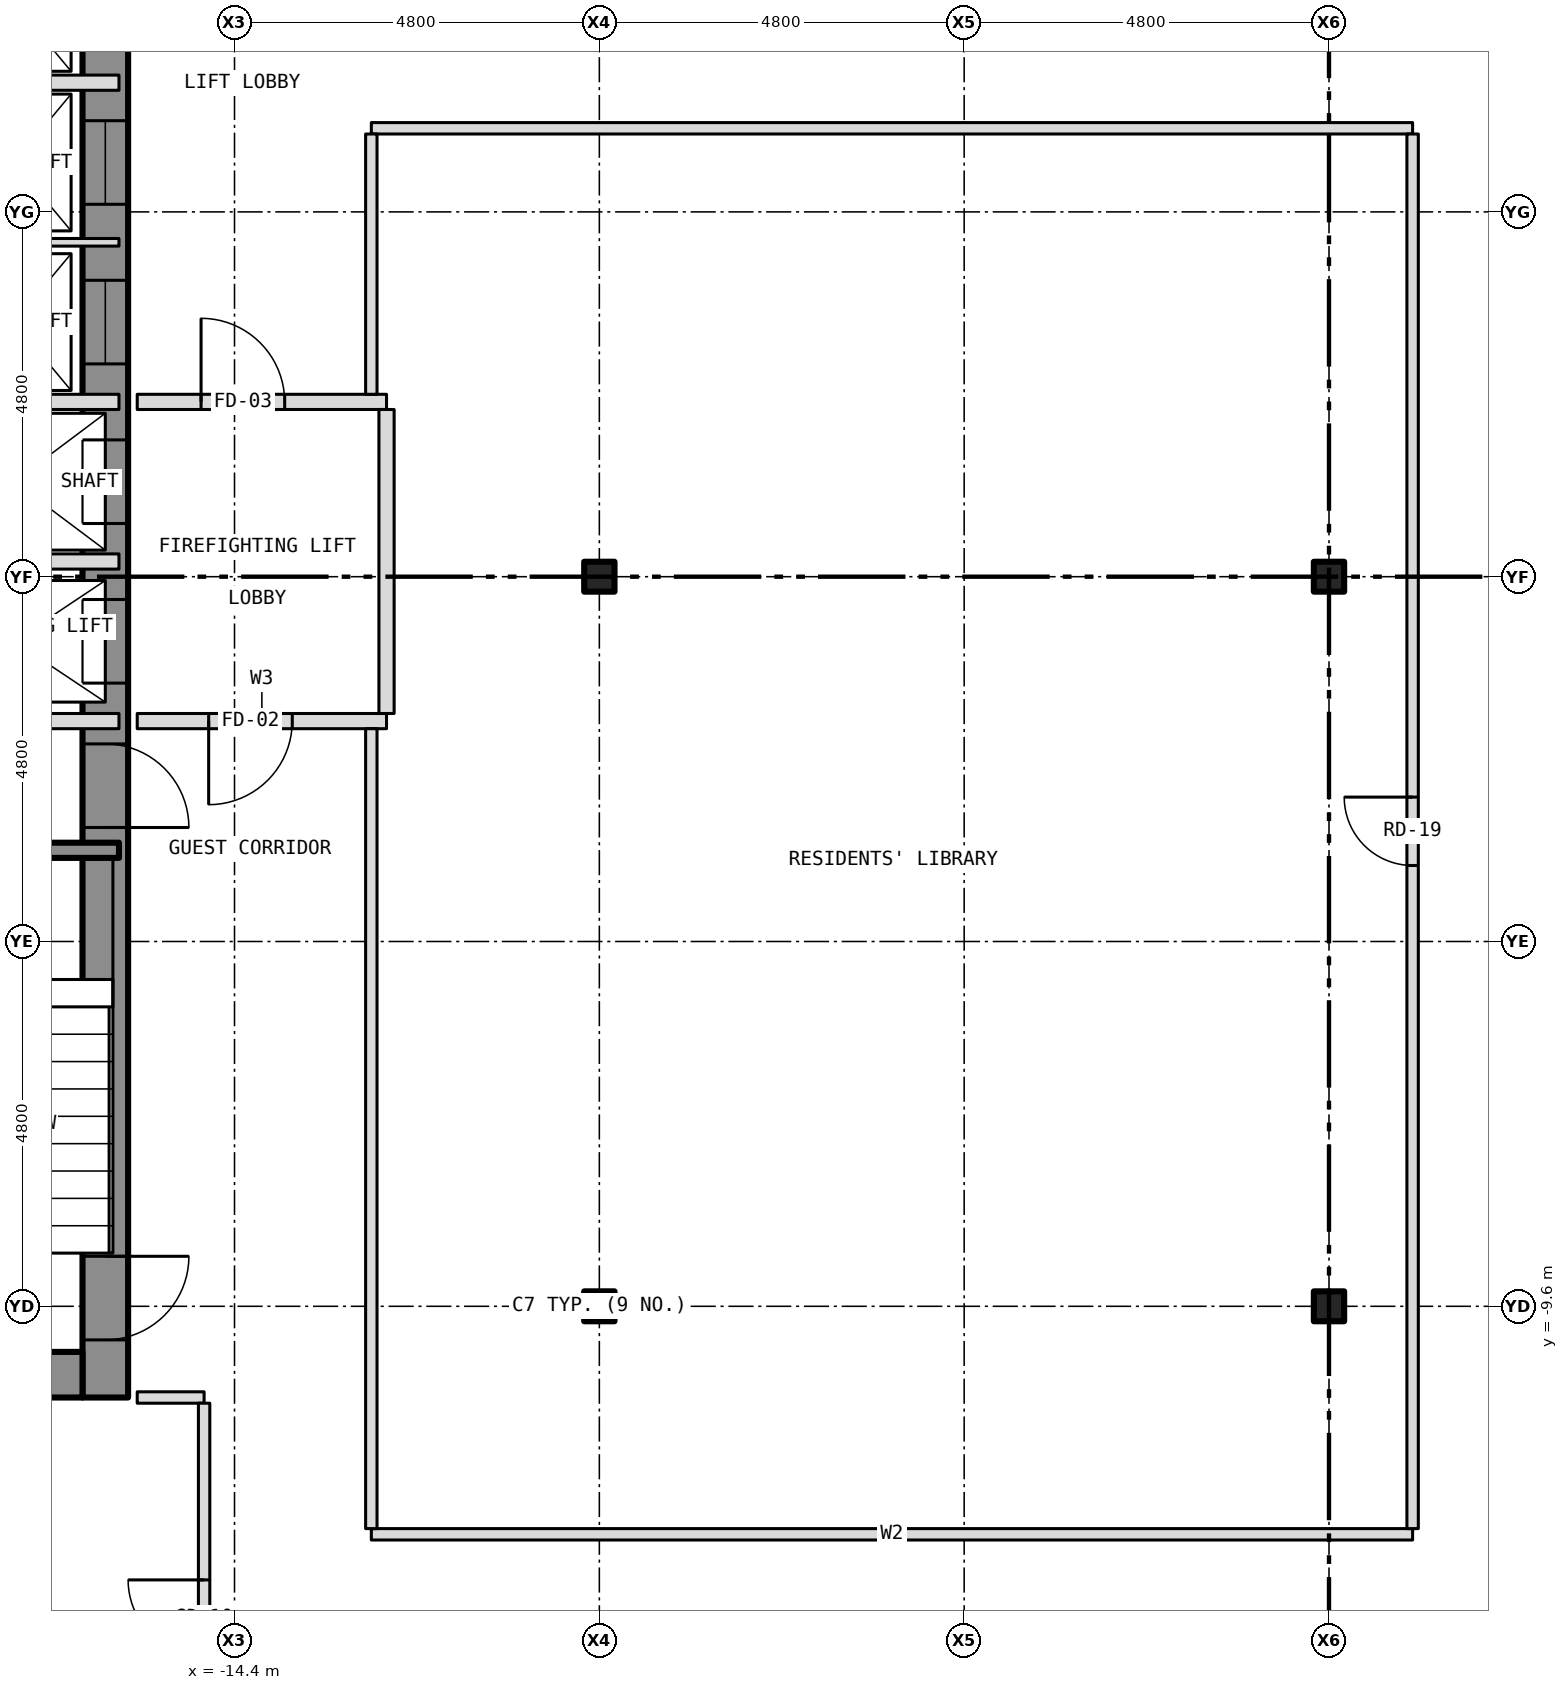
"""IFC4 building model, lengths in metres.
Left out: names, types, materials, properties, quantities, classifications, styles, units other than length and angle.
Written with IfcOpenShell. Run it as: python <this file> out.ifc"""

import sys

from ifc_helpers import new_model, si_unit, direction, frame, frame_2d, origin, origin_2d, place, context, subcontext, project, spatial, rectangle, i_section, extrude, element, fill, save


model = new_model("IFC4")
c1 = context("Model", 3, precision=1e-05, world=origin(), true_north=direction((0.0, 1.0)))
c2 = subcontext(c1, "Body", "Model", "MODEL_VIEW")
j1 = project(units=[si_unit("LENGTHUNIT", "METRE"), si_unit("PLANEANGLEUNIT", "RADIAN")], contexts=[c1])
p1 = place(None, origin())
s1 = spatial("IfcSite", under=j1, at=p1, CompositionType="ELEMENT")
p2 = place(p1, origin())
s2 = spatial("IfcBuilding", under=s1, at=p2, CompositionType="ELEMENT")
p3 = place(p2, frame((0.0, 0.0, 96.0)))
s3 = spatial("IfcBuildingStorey", under=s2, at=p3, CompositionType="ELEMENT", Elevation=96.0)
for number, where, z_axis, x_axis in (
    (1, (-9.6, -9.6, -0.15), (0.0, 0.0, 1.0), (1.0, 0.0, 0.0)),
    (2, (-9.6, 0.0, -0.15), (0.0, 0.0, 1.0), (1.0, 0.0, 0.0)),
    (3, (0.0, -9.6, -0.15), (0.0, 0.0, 1.0), (1.0, 0.0, 0.0)),
    (4, (0.0, 0.0, -0.15), (0.0, 0.0, 1.0), (1.0, 0.0, 0.0)),
):
    element("IfcColumn", number, at=place(p3, frame(where, z_axis=z_axis, x_axis=x_axis)), inside=s3, PredefinedType="COLUMN", context=c2, shape_type="SweptSolid", body=[
        extrude(i_section(OverallWidth=0.399, OverallDepth=0.394, WebThickness=0.023, FlangeThickness=0.037, at=origin_2d()), origin(), (0.0, 0.0, 1.0), 3.5),
    ])
p4 = place(p3, frame((-16.1, -10.8, 0.0), z_axis=(0.0, 0.0, 1.0), x_axis=(0.0, 1.0, 0.0)))
e5 = element("IfcWall", 5, at=p4, inside=s3, PredefinedType="SHEAR", context=c2, shape_type="SweptSolid", body=[
    extrude(rectangle(XDim=21.6, YDim=0.6, at=frame_2d((10.8, 0.0))), origin(), (0.0, 0.0, 1.0), 3.25),
])
p5 = place(p4, frame((9.4, 0.0, 0.0)))
e6 = element("IfcOpeningElement", 6, at=p5, cuts=e5, PredefinedType="OPENING", context=c2, shape_type="SweptSolid", body=[
    extrude(rectangle(XDim=1.1, YDim=2.1, at=frame_2d((0.55, 1.05))), frame((0.0, 0.312, 0.0), z_axis=(0.0, -1.0, 0.0), x_axis=(1.0, 0.0, 0.0)), (0.0, 0.0, 1.0), 0.624),
])
p6 = place(p4, frame((11.5, 0.0, 0.0)))
e7 = element("IfcOpeningElement", 7, at=p6, cuts=e5, PredefinedType="OPENING", context=c2, shape_type="SweptSolid", body=[
    extrude(rectangle(XDim=1.1, YDim=2.1, at=frame_2d((0.55, 1.05))), frame((0.0, 0.312, 0.0), z_axis=(0.0, -1.0, 0.0), x_axis=(1.0, 0.0, 0.0)), (0.0, 0.0, 1.0), 0.624),
])
p7 = place(p4, frame((13.6, 0.0, 0.0)))
e8 = element("IfcOpeningElement", 8, at=p7, cuts=e5, PredefinedType="OPENING", context=c2, shape_type="SweptSolid", body=[
    extrude(rectangle(XDim=1.1, YDim=2.1, at=frame_2d((0.55, 1.05))), frame((0.0, 0.312, 0.0), z_axis=(0.0, -1.0, 0.0), x_axis=(1.0, 0.0, 0.0)), (0.0, 0.0, 1.0), 0.624),
])
p8 = place(p4, frame((15.7, 0.0, 0.0)))
e9 = element("IfcOpeningElement", 9, at=p8, cuts=e5, PredefinedType="OPENING", context=c2, shape_type="SweptSolid", body=[
    extrude(rectangle(XDim=1.1, YDim=2.1, at=frame_2d((0.55, 1.05))), frame((0.0, 0.312, 0.0), z_axis=(0.0, -1.0, 0.0), x_axis=(1.0, 0.0, 0.0)), (0.0, 0.0, 1.0), 0.624),
])
p9 = place(p4, frame((17.8, 0.0, 0.0)))
e10 = element("IfcOpeningElement", 10, at=p9, cuts=e5, PredefinedType="OPENING", context=c2, shape_type="SweptSolid", body=[
    extrude(rectangle(XDim=1.1, YDim=2.1, at=frame_2d((0.55, 1.05))), frame((0.0, 0.312, 0.0), z_axis=(0.0, -1.0, 0.0), x_axis=(1.0, 0.0, 0.0)), (0.0, 0.0, 1.0), 0.624),
])
p10 = place(p4, frame((0.758, 0.0, 0.0)))
e11 = element("IfcOpeningElement", 11, at=p10, cuts=e5, PredefinedType="OPENING", context=c2, shape_type="SweptSolid", body=[
    extrude(rectangle(XDim=1.1, YDim=2.1, at=frame_2d((0.55, 1.05))), frame((0.0, 0.312, 0.0), z_axis=(0.0, -1.0, 0.0), x_axis=(1.0, 0.0, 0.0)), (0.0, 0.0, 1.0), 0.624),
])
p11 = place(p4, frame((7.5, 0.0, 0.0)))
e12 = element("IfcOpeningElement", 12, at=p11, cuts=e5, PredefinedType="OPENING", context=c2, shape_type="SweptSolid", body=[
    extrude(rectangle(XDim=1.1, YDim=2.1, at=frame_2d((0.55, 1.05))), frame((0.0, 0.312, 0.0), z_axis=(0.0, -1.0, 0.0), x_axis=(1.0, 0.0, 0.0)), (0.0, 0.0, 1.0), 0.624),
])
p12 = place(p3, frame((-22.2, -10.5, 0.0), z_axis=(0.0, 0.0, 1.0), x_axis=(1.0, 0.0, 0.0)))
e13 = element("IfcWall", 13, at=p12, inside=s3, PredefinedType="SHEAR", context=c2, shape_type="SweptSolid", body=[
    extrude(rectangle(XDim=5.8, YDim=0.6, at=frame_2d((2.9, 0.0))), origin(), (0.0, 0.0, 1.0), 3.25),
])
p13 = place(p3, frame((-12.6, -12.6, 0.0), z_axis=(0.0, 0.0, 1.0), x_axis=(1.0, 0.0, 0.0)))
e14 = element("IfcWall", 14, at=p13, inside=s3, PredefinedType="PARTITIONING", context=c2, shape_type="SweptSolid", body=[
    extrude(rectangle(XDim=13.7, YDim=0.15, at=frame_2d((6.85, 0.0))), origin(), (0.0, 0.0, 1.0), 3.35),
])
p14 = place(p3, frame((-15.68, -10.8, 0.0), z_axis=(0.0, 0.0, 1.0), x_axis=(1.0, 0.0, 0.0)))
e15 = element("IfcWall", 15, at=p14, inside=s3, PredefinedType="PARTITIONING", context=c2, shape_type="SweptSolid", body=[
    extrude(rectangle(XDim=0.88, YDim=0.15, at=frame_2d((0.44, 0.0))), origin(), (0.0, 0.0, 1.0), 3.35),
])
p15 = place(p3, frame((-20.0, -3.6, 0.0), z_axis=(0.0, 0.0, 1.0), x_axis=(1.0, 0.0, 0.0)))
e16 = element("IfcWall", 16, at=p15, inside=s3, PredefinedType="SHEAR", context=c2, shape_type="SweptSolid", body=[
    extrude(rectangle(XDim=4.08, YDim=0.2, at=frame_2d((2.04, 0.0))), origin(), (0.0, 0.0, 1.0), 3.25),
])
p16 = place(p3, frame((-22.68, -1.9, 0.0), z_axis=(0.0, 0.0, 1.0), x_axis=(1.0, 0.0, 0.0)))
e17 = element("IfcWall", 17, at=p16, inside=s3, PredefinedType="PARTITIONING", context=c2, shape_type="SweptSolid", body=[
    extrude(rectangle(XDim=6.76, YDim=0.2, at=frame_2d((3.38, 0.0))), origin(), (0.0, 0.0, 1.0), 3.25),
])
p17 = place(p16, frame((2.12, 0.0, 0.0)))
e18 = element("IfcOpeningElement", 18, at=p17, cuts=e17, PredefinedType="OPENING", context=c2, shape_type="SweptSolid", body=[
    extrude(rectangle(XDim=0.9, YDim=2.1, at=frame_2d((0.45, 1.05))), frame((0.0, 0.112, 0.0), z_axis=(0.0, -1.0, 0.0), x_axis=(1.0, 0.0, 0.0)), (0.0, 0.0, 1.0), 0.224),
])
p18 = place(p3, frame((-15.68, -1.9, 0.0), z_axis=(0.0, 0.0, 1.0), x_axis=(1.0, 0.0, 0.0)))
e19 = element("IfcWall", 19, at=p18, inside=s3, PredefinedType="PARTITIONING", context=c2, shape_type="SweptSolid", body=[
    extrude(rectangle(XDim=3.28, YDim=0.2, at=frame_2d((1.64, 0.0))), origin(), (0.0, 0.0, 1.0), 3.35),
])
p19 = place(p18, frame((0.94, 0.0, 0.0)))
e20 = element("IfcOpeningElement", 20, at=p19, cuts=e19, PredefinedType="OPENING", context=c2, shape_type="SweptSolid", body=[
    extrude(rectangle(XDim=1.1, YDim=2.1, at=frame_2d((0.55, 1.05))), frame((0.0, 0.112, 0.0), z_axis=(0.0, -1.0, 0.0), x_axis=(1.0, 0.0, 0.0)), (0.0, 0.0, 1.0), 0.224),
])
for number, where, z_axis, x_axis in (
    (21, (-18.8, 0.2, 0.0), (0.0, 0.0, 1.0), (1.0, 0.0, 0.0)),
    (22, (-18.8, 2.3, 0.0), (0.0, 0.0, 1.0), (1.0, 0.0, 0.0)),
):
    element("IfcWall", number, at=place(p3, frame(where, z_axis=z_axis, x_axis=x_axis)), inside=s3, PredefinedType="PARTITIONING", context=c2, shape_type="SweptSolid", body=[
        extrude(rectangle(XDim=2.88, YDim=0.2, at=frame_2d((1.44, 0.0))), origin(), (0.0, 0.0, 1.0), 3.25),
    ])
p20 = place(p3, frame((-15.68, 2.3, 0.0), z_axis=(0.0, 0.0, 1.0), x_axis=(1.0, 0.0, 0.0)))
e23 = element("IfcWall", 23, at=p20, inside=s3, PredefinedType="PARTITIONING", context=c2, shape_type="SweptSolid", body=[
    extrude(rectangle(XDim=3.28, YDim=0.2, at=frame_2d((1.64, 0.0))), origin(), (0.0, 0.0, 1.0), 3.35),
])
p21 = place(p20, frame((0.84, 0.0, 0.0)))
e24 = element("IfcOpeningElement", 24, at=p21, cuts=e23, PredefinedType="OPENING", context=c2, shape_type="SweptSolid", body=[
    extrude(rectangle(XDim=1.1, YDim=2.1, at=frame_2d((0.55, 1.05))), frame((0.0, 0.112, 0.0), z_axis=(0.0, -1.0, 0.0), x_axis=(1.0, 0.0, 0.0)), (0.0, 0.0, 1.0), 0.224),
])
p22 = place(p3, frame((-22.68, 4.4, 0.0), z_axis=(0.0, 0.0, 1.0), x_axis=(1.0, 0.0, 0.0)))
e25 = element("IfcWall", 25, at=p22, inside=s3, PredefinedType="PARTITIONING", context=c2, shape_type="SweptSolid", body=[
    extrude(rectangle(XDim=6.76, YDim=0.1, at=frame_2d((3.38, 0.0))), origin(), (0.0, 0.0, 1.0), 3.25),
])
p23 = place(p22, frame((1.43, 0.0, 0.0)))
e26 = element("IfcOpeningElement", 26, at=p23, cuts=e25, PredefinedType="OPENING", context=c2, shape_type="SweptSolid", body=[
    extrude(rectangle(XDim=0.9, YDim=2.1, at=frame_2d((0.45, 1.05))), frame((0.0, 0.062, 0.0), z_axis=(0.0, -1.0, 0.0), x_axis=(1.0, 0.0, 0.0)), (0.0, 0.0, 1.0), 0.124),
])
p24 = place(p3, frame((-12.6, 5.9, 0.0), z_axis=(0.0, 0.0, 1.0), x_axis=(1.0, 0.0, 0.0)))
e27 = element("IfcWall", 27, at=p24, inside=s3, PredefinedType="PARTITIONING", context=c2, shape_type="SweptSolid", body=[
    extrude(rectangle(XDim=13.7, YDim=0.15, at=frame_2d((6.85, 0.0))), origin(), (0.0, 0.0, 1.0), 3.35),
])
p25 = place(p3, frame((-18.8, 6.5, 0.0), z_axis=(0.0, 0.0, 1.0), x_axis=(1.0, 0.0, 0.0)))
e28 = element("IfcWall", 28, at=p25, inside=s3, PredefinedType="PARTITIONING", context=c2, shape_type="SweptSolid", body=[
    extrude(rectangle(XDim=2.88, YDim=0.2, at=frame_2d((1.44, 0.0))), origin(), (0.0, 0.0, 1.0), 3.25),
])
p26 = place(p3, frame((-14.8, -14.725, 0.0), z_axis=(0.0, 0.0, 1.0), x_axis=(0.0, 1.0, 0.0)))
e29 = element("IfcWall", 29, at=p26, inside=s3, PredefinedType="PARTITIONING", context=c2, shape_type="SweptSolid", body=[
    extrude(rectangle(XDim=3.85, YDim=0.15, at=frame_2d((1.925, 0.0))), origin(), (0.0, 0.0, 1.0), 3.35),
])
p27 = place(p26, frame((0.525, 0.0, 0.0)))
e30 = element("IfcOpeningElement", 30, at=p27, cuts=e29, PredefinedType="OPENING", context=c2, shape_type="SweptSolid", body=[
    extrude(rectangle(XDim=1.0, YDim=2.1, at=frame_2d((0.5, 1.05))), frame((0.0, 0.087, 0.0), z_axis=(0.0, -1.0, 0.0), x_axis=(1.0, 0.0, 0.0)), (0.0, 0.0, 1.0), 0.174),
])
p28 = place(p3, frame((-12.6, -12.525, 0.0), z_axis=(0.0, 0.0, 1.0), x_axis=(0.0, 1.0, 0.0)))
e31 = element("IfcWall", 31, at=p28, inside=s3, PredefinedType="PARTITIONING", context=c2, shape_type="SweptSolid", body=[
    extrude(rectangle(XDim=10.525, YDim=0.15, at=frame_2d((5.262, 0.0))), origin(), (0.0, 0.0, 1.0), 3.35),
])
p29 = place(p3, frame((-12.6, 2.4, 0.0), z_axis=(0.0, 0.0, 1.0), x_axis=(0.0, 1.0, 0.0)))
e32 = element("IfcWall", 32, at=p29, inside=s3, PredefinedType="PARTITIONING", context=c2, shape_type="SweptSolid", body=[
    extrude(rectangle(XDim=3.425, YDim=0.15, at=frame_2d((1.712, 0.0))), origin(), (0.0, 0.0, 1.0), 3.35),
])
p30 = place(p3, frame((-12.4, -1.8, 0.0), z_axis=(0.0, 0.0, 1.0), x_axis=(0.0, 1.0, 0.0)))
e33 = element("IfcWall", 33, at=p30, inside=s3, PredefinedType="PARTITIONING", context=c2, shape_type="SweptSolid", body=[
    extrude(rectangle(XDim=4.0, YDim=0.2, at=frame_2d((2.0, 0.0))), origin(), (0.0, 0.0, 1.0), 3.35),
])
p31 = place(p3, frame((1.1, -12.525, 0.0), z_axis=(0.0, 0.0, 1.0), x_axis=(0.0, 1.0, 0.0)))
e34 = element("IfcWall", 34, at=p31, inside=s3, PredefinedType="PARTITIONING", context=c2, shape_type="SweptSolid", body=[
    extrude(rectangle(XDim=18.35, YDim=0.15, at=frame_2d((9.175, 0.0))), origin(), (0.0, 0.0, 1.0), 3.35),
])
p32 = place(p31, frame((8.725, 0.0, 0.0)))
e35 = element("IfcOpeningElement", 35, at=p32, cuts=e34, PredefinedType="OPENING", context=c2, shape_type="SweptSolid", body=[
    extrude(rectangle(XDim=0.9, YDim=2.1, at=frame_2d((0.45, 1.05))), frame((0.0, 0.087, 0.0), z_axis=(0.0, -1.0, 0.0), x_axis=(1.0, 0.0, 0.0)), (0.0, 0.0, 1.0), 0.174),
])
p33 = place(p5, origin())
e36 = element("IfcDoor", 36, at=p33, inside=s3, OperationType="SLIDING_TO_LEFT", PredefinedType="DOOR", context=c2, shape_type="SweptSolid", body=[
    extrude(rectangle(XDim=1.1, YDim=2.1, at=frame_2d((0.55, 1.05))), frame((0.0, 0.025, 0.0), z_axis=(0.0, -1.0, 0.0), x_axis=(1.0, 0.0, 0.0)), (0.0, 0.0, 1.0), 0.05),
])
fill(e6, e36)
p34 = place(p6, origin())
e37 = element("IfcDoor", 37, at=p34, inside=s3, OperationType="SLIDING_TO_LEFT", PredefinedType="DOOR", context=c2, shape_type="SweptSolid", body=[
    extrude(rectangle(XDim=1.1, YDim=2.1, at=frame_2d((0.55, 1.05))), frame((0.0, 0.025, 0.0), z_axis=(0.0, -1.0, 0.0), x_axis=(1.0, 0.0, 0.0)), (0.0, 0.0, 1.0), 0.05),
])
fill(e7, e37)
p35 = place(p7, origin())
e38 = element("IfcDoor", 38, at=p35, inside=s3, OperationType="SLIDING_TO_LEFT", PredefinedType="DOOR", context=c2, shape_type="SweptSolid", body=[
    extrude(rectangle(XDim=1.1, YDim=2.1, at=frame_2d((0.55, 1.05))), frame((0.0, 0.025, 0.0), z_axis=(0.0, -1.0, 0.0), x_axis=(1.0, 0.0, 0.0)), (0.0, 0.0, 1.0), 0.05),
])
fill(e8, e38)
p36 = place(p8, origin())
e39 = element("IfcDoor", 39, at=p36, inside=s3, OperationType="SLIDING_TO_LEFT", PredefinedType="DOOR", context=c2, shape_type="SweptSolid", body=[
    extrude(rectangle(XDim=1.1, YDim=2.1, at=frame_2d((0.55, 1.05))), frame((0.0, 0.025, 0.0), z_axis=(0.0, -1.0, 0.0), x_axis=(1.0, 0.0, 0.0)), (0.0, 0.0, 1.0), 0.05),
])
fill(e9, e39)
p37 = place(p10, origin())
e40 = element("IfcDoor", 40, at=p37, inside=s3, OperationType="SINGLE_SWING_RIGHT", PredefinedType="DOOR", context=c2, shape_type="SweptSolid", body=[
    extrude(rectangle(XDim=1.1, YDim=2.1, at=frame_2d((0.55, 1.05))), frame((0.0, 0.025, 0.0), z_axis=(0.0, -1.0, 0.0), x_axis=(1.0, 0.0, 0.0)), (0.0, 0.0, 1.0), 0.05),
])
fill(e11, e40)
p38 = place(p11, origin())
e41 = element("IfcDoor", 41, at=p38, inside=s3, OperationType="SINGLE_SWING_LEFT", PredefinedType="DOOR", context=c2, shape_type="SweptSolid", body=[
    extrude(rectangle(XDim=1.1, YDim=2.1, at=frame_2d((0.55, 1.05))), frame((0.0, 0.025, 0.0), z_axis=(0.0, -1.0, 0.0), x_axis=(1.0, 0.0, 0.0)), (0.0, 0.0, 1.0), 0.05),
])
fill(e12, e41)
p39 = place(p19, origin())
e42 = element("IfcDoor", 42, at=p39, inside=s3, OperationType="SINGLE_SWING_LEFT", PredefinedType="DOOR", context=c2, shape_type="SweptSolid", body=[
    extrude(rectangle(XDim=1.1, YDim=2.1, at=frame_2d((0.55, 1.05))), frame((0.0, 0.025, 0.0), z_axis=(0.0, -1.0, 0.0), x_axis=(1.0, 0.0, 0.0)), (0.0, 0.0, 1.0), 0.05),
])
fill(e20, e42)
p40 = place(p21, origin())
e43 = element("IfcDoor", 43, at=p40, inside=s3, OperationType="SINGLE_SWING_LEFT", PredefinedType="DOOR", context=c2, shape_type="SweptSolid", body=[
    extrude(rectangle(XDim=1.1, YDim=2.1, at=frame_2d((0.55, 1.05))), frame((0.0, 0.025, 0.0), z_axis=(0.0, -1.0, 0.0), x_axis=(1.0, 0.0, 0.0)), (0.0, 0.0, 1.0), 0.05),
])
fill(e24, e43)
p41 = place(p27, origin())
e44 = element("IfcDoor", 44, at=p41, inside=s3, OperationType="SINGLE_SWING_RIGHT", PredefinedType="DOOR", context=c2, shape_type="SweptSolid", body=[
    extrude(rectangle(XDim=1.0, YDim=2.1, at=frame_2d((0.5, 1.05))), frame((0.0, 0.025, 0.0), z_axis=(0.0, -1.0, 0.0), x_axis=(1.0, 0.0, 0.0)), (0.0, 0.0, 1.0), 0.05),
])
fill(e30, e44)
p42 = place(p32, origin())
e45 = element("IfcDoor", 45, at=p42, inside=s3, OperationType="SINGLE_SWING_RIGHT", PredefinedType="DOOR", context=c2, shape_type="SweptSolid", body=[
    extrude(rectangle(XDim=0.9, YDim=2.1, at=frame_2d((0.45, 1.05))), frame((0.0, 0.025, 0.0), z_axis=(0.0, -1.0, 0.0), x_axis=(1.0, 0.0, 0.0)), (0.0, 0.0, 1.0), 0.05),
])
fill(e35, e45)
save(model, sys.argv[1])
